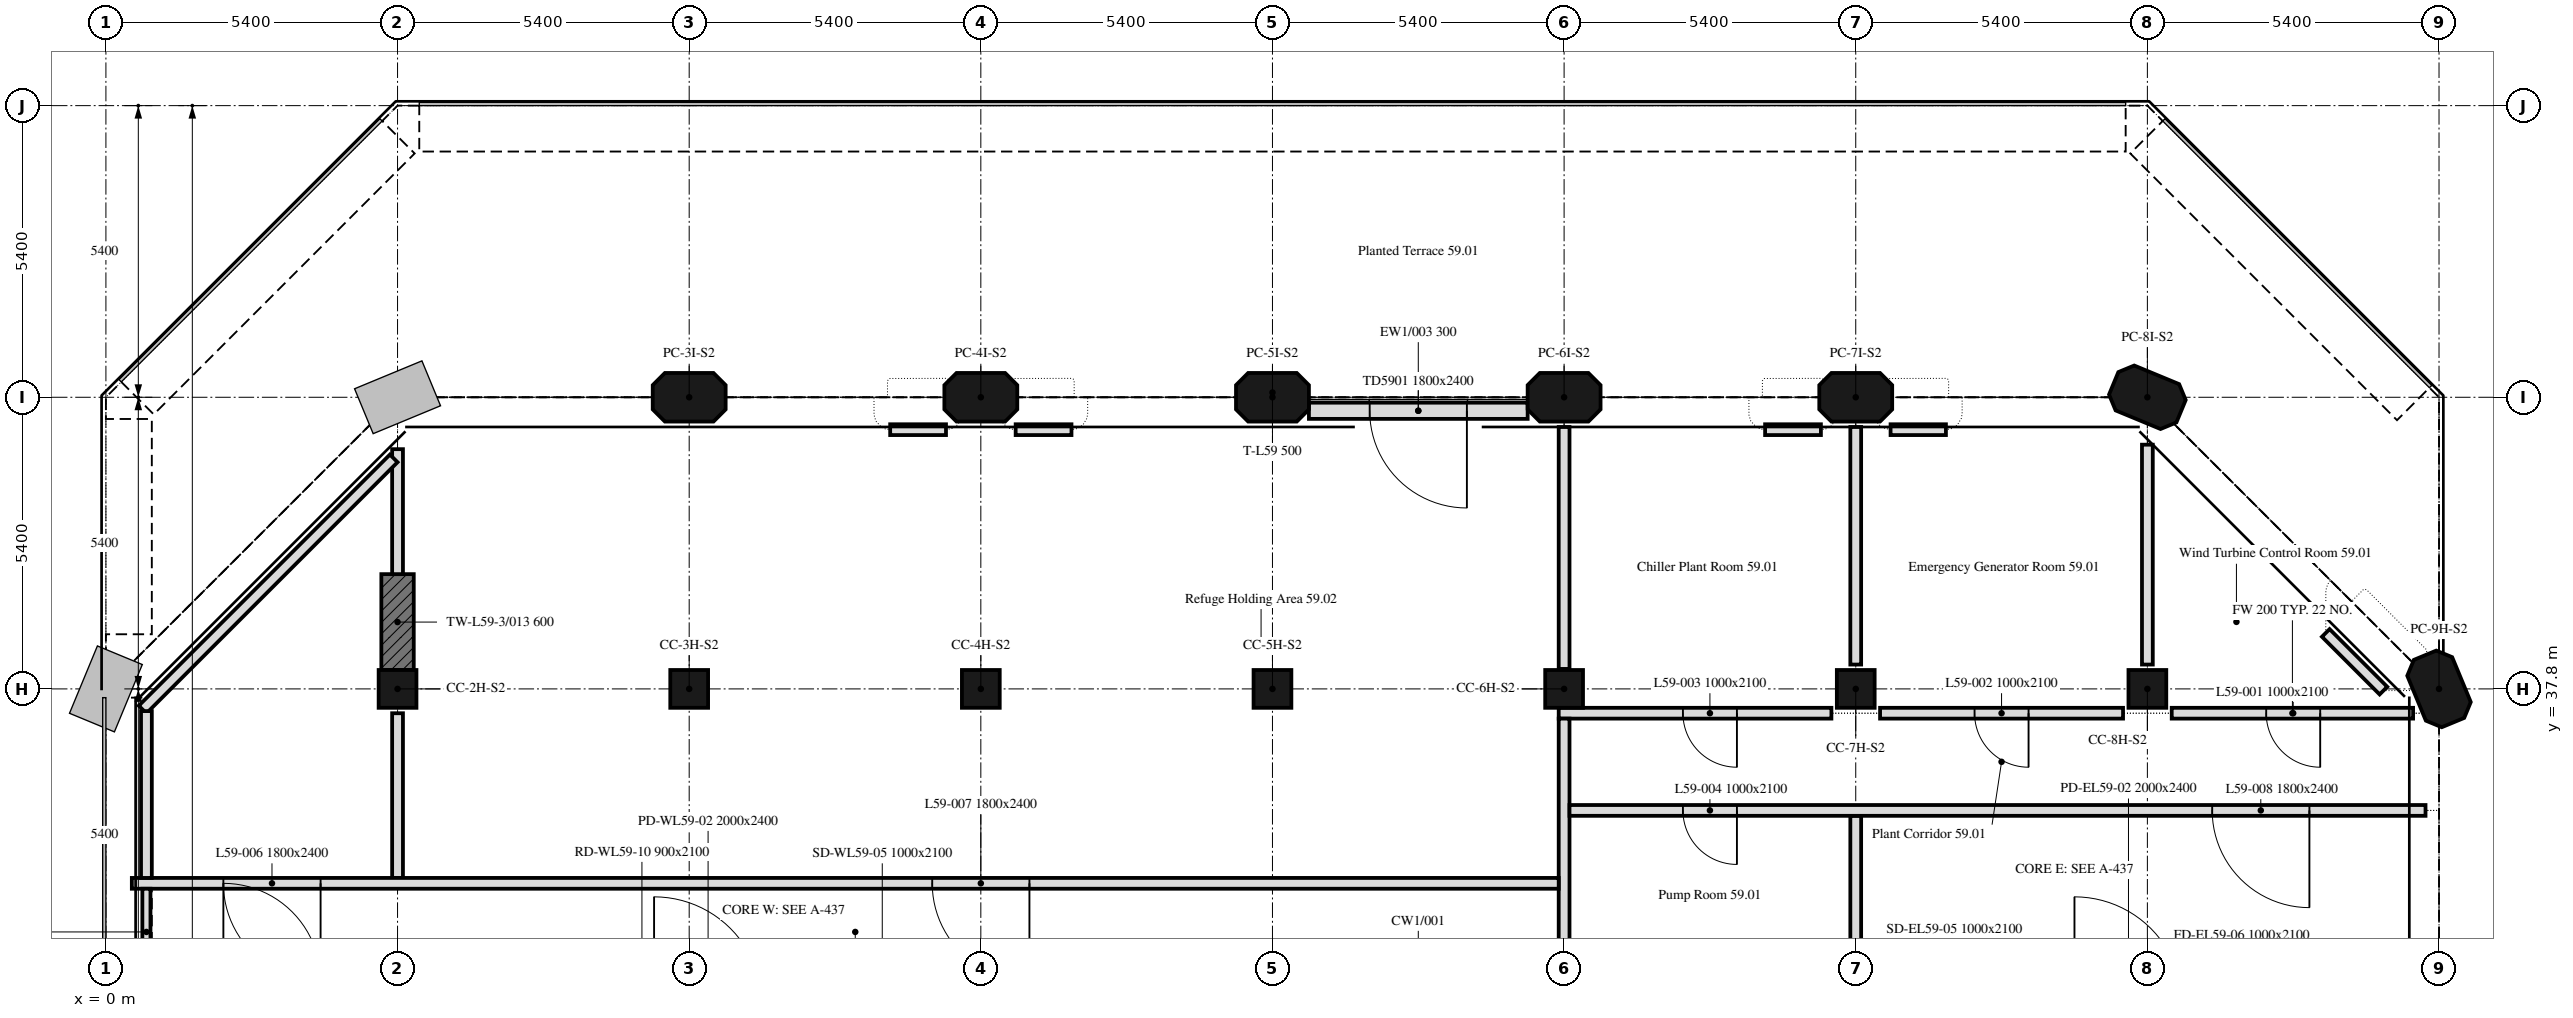
"""IFC4 building model, lengths in metres.
Left out: names, types, materials, properties, quantities, classifications, styles, units other than length and angle.
Written with IfcOpenShell. Run it as: python <this file> out.ifc"""

import sys

from ifc_helpers import new_model, si_unit, direction, frame, frame_2d, origin, origin_2d, place, context, subcontext, project, spatial, polyline, rectangle, outline, extrude, element, fill, save


model = new_model("IFC4")
c1 = context("Model", 3, precision=1e-05, world=origin(), true_north=direction((0.0, 1.0)))
c2 = subcontext(c1, "Body", "Model", "MODEL_VIEW")
j1 = project(units=[si_unit("LENGTHUNIT", "METRE"), si_unit("PLANEANGLEUNIT", "RADIAN")], contexts=[c1])
p1 = place(None, origin())
s1 = spatial("IfcSite", under=j1, at=p1, CompositionType="ELEMENT")
p2 = place(p1, origin())
s2 = spatial("IfcBuilding", under=s1, at=p2, CompositionType="ELEMENT")
p3 = place(p2, frame((0.0, 0.0, 233.5)))
s3 = spatial("IfcBuildingStorey", under=s2, at=p3, CompositionType="ELEMENT", Elevation=233.5)
for number, where, z_axis, x_axis in (
    (1, (5.4, 37.8, 0.0), (0.0, 0.0, 1.0), (1.0, 0.0, 0.0)),
    (2, (10.8, 37.8, 0.0), (0.0, 0.0, 1.0), (1.0, 0.0, 0.0)),
    (3, (16.2, 37.8, 0.0), (0.0, 0.0, 1.0), (1.0, 0.0, 0.0)),
    (4, (21.6, 37.8, 0.0), (0.0, 0.0, 1.0), (1.0, 0.0, 0.0)),
    (5, (27.0, 37.8, 0.0), (0.0, 0.0, 1.0), (1.0, 0.0, 0.0)),
    (6, (32.4, 37.8, 0.0), (0.0, 0.0, 1.0), (1.0, 0.0, 0.0)),
    (7, (37.8, 37.8, 0.0), (0.0, 0.0, 1.0), (1.0, 0.0, 0.0)),
):
    element("IfcColumn", number, at=place(p3, frame(where, z_axis=z_axis, x_axis=x_axis)), inside=s3, PredefinedType="COLUMN", context=c2, shape_type="SweptSolid", body=[
        extrude(rectangle(XDim=0.7, YDim=0.7, at=origin_2d()), origin(), (0.0, 0.0, 1.0), 9.3),
    ])
for number, where, z_axis, x_axis in (
    (8, (43.2, 37.8, 0.0), (0.0, 0.0, 1.0), (-0.383, 0.924, 0.0)),
    (9, (10.8, 43.2, 0.0), (0.0, 0.0, 1.0), (1.0, 0.0, 0.0)),
    (10, (16.2, 43.2, 0.0), (0.0, 0.0, 1.0), (1.0, 0.0, 0.0)),
    (11, (21.6, 43.2, 0.0), (0.0, 0.0, 1.0), (1.0, 0.0, 0.0)),
    (12, (27.0, 43.2, 0.0), (0.0, 0.0, 1.0), (1.0, 0.0, 0.0)),
    (13, (32.4, 43.2, 0.0), (0.0, 0.0, 1.0), (1.0, 0.0, 0.0)),
    (14, (37.8, 43.2, 0.0), (0.0, 0.0, 1.0), (-0.924, 0.383, 0.0)),
):
    element("IfcColumn", number, at=place(p3, frame(where, z_axis=z_axis, x_axis=x_axis)), inside=s3, PredefinedType="COLUMN", context=c2, shape_type="SweptSolid", body=[
        extrude(outline(polyline([(-0.45, -0.45), (0.45, -0.45), (0.675, -0.225), (0.675, 0.225), (0.45, 0.45), (-0.45, 0.45), (-0.675, 0.225), (-0.675, -0.225), (-0.45, -0.45)])), origin(), (0.0, 0.0, 1.0), 9.3),
    ])
p4 = place(p3, frame((5.4, 38.15, 0.0), z_axis=(0.0, 0.0, 1.0), x_axis=(0.0, 1.0, 0.0)))
e15 = element("IfcWall", 15, at=p4, inside=s3, PredefinedType="SHEAR", context=c2, shape_type="SweptSolid", body=[
    extrude(rectangle(XDim=1.775, YDim=0.6, at=frame_2d((0.888, 0.0))), origin(), (0.0, 0.0, 1.0), 9.3),
])
p5 = place(p3, frame((26.325, 42.95, 0.0), z_axis=(0.0, 0.0, 1.0), x_axis=(-1.0, 0.0, 0.0)))
e16 = element("IfcWall", 16, at=p5, inside=s3, PredefinedType="SOLIDWALL", context=c2, shape_type="SweptSolid", body=[
    extrude(rectangle(XDim=4.05, YDim=0.3, at=frame_2d((2.025, 0.0))), origin(), (0.0, 0.0, 1.0), 9.3),
])
p6 = place(p5, frame((1.125, 0.0, 0.0)))
e17 = element("IfcOpeningElement", 17, at=p6, cuts=e16, PredefinedType="OPENING", context=c2, shape_type="SweptSolid", body=[
    extrude(rectangle(XDim=1.8, YDim=2.4, at=frame_2d((0.9, 1.2))), frame((0.0, 0.16, 0.0), z_axis=(0.0, -1.0, 0.0), x_axis=(1.0, 0.0, 0.0)), (0.0, 0.0, 1.0), 0.32),
])
p7 = place(p3, frame((42.72, 37.35, 0.0), z_axis=(0.0, 0.0, 1.0), x_axis=(-1.0, 0.0, 0.0)))
e18 = element("IfcWall", 18, at=p7, inside=s3, PredefinedType="PARTITIONING", context=c2, shape_type="SweptSolid", body=[
    extrude(rectangle(XDim=4.469, YDim=0.2, at=frame_2d((2.235, 0.0))), origin(), (0.0, 0.0, 1.0), 9.3),
])
p8 = place(p7, frame((1.72, 0.0, 0.0)))
e19 = element("IfcOpeningElement", 19, at=p8, cuts=e18, PredefinedType="OPENING", context=c2, shape_type="SweptSolid", body=[
    extrude(rectangle(XDim=1.0, YDim=2.1, at=frame_2d((0.5, 1.05))), frame((0.0, 0.1, 0.0), z_axis=(0.0, -1.0, 0.0), x_axis=(1.0, 0.0, 0.0)), (0.0, 0.0, 1.0), 0.2),
])
p9 = place(p3, frame((37.8, 38.251, 0.0), z_axis=(0.0, 0.0, 1.0), x_axis=(0.0, 1.0, 0.0)))
e20 = element("IfcWall", 20, at=p9, inside=s3, PredefinedType="PARTITIONING", context=c2, shape_type="SweptSolid", body=[
    extrude(rectangle(XDim=4.072, YDim=0.2, at=frame_2d((2.036, 0.0))), origin(), (0.0, 0.0, 1.0), 9.3),
])
p10 = place(p3, frame((41.103, 38.836, 0.0), z_axis=(0.0, 0.0, 1.0), x_axis=(0.707187616485, -0.707025936646, 0.0)))
e21 = element("IfcWall", 21, at=p10, inside=s3, PredefinedType="PARTITIONING", context=c2, shape_type="SweptSolid", body=[
    extrude(rectangle(XDim=1.51, YDim=0.2, at=frame_2d((0.755, 0.0))), origin(), (0.0, 0.0, 1.0), 9.3),
])
p11 = place(p3, frame((37.349, 37.35, 0.0), z_axis=(0.0, 0.0, 1.0), x_axis=(-1.0, 0.0, 0.0)))
e22 = element("IfcWall", 22, at=p11, inside=s3, PredefinedType="PARTITIONING", context=c2, shape_type="SweptSolid", body=[
    extrude(rectangle(XDim=4.499, YDim=0.2, at=frame_2d((2.25, 0.0))), origin(), (0.0, 0.0, 1.0), 9.3),
])
p12 = place(p11, frame((1.75, 0.0, 0.0)))
e23 = element("IfcOpeningElement", 23, at=p12, cuts=e22, PredefinedType="OPENING", context=c2, shape_type="SweptSolid", body=[
    extrude(rectangle(XDim=1.0, YDim=2.1, at=frame_2d((0.5, 1.05))), frame((0.0, 0.1, 0.0), z_axis=(0.0, -1.0, 0.0), x_axis=(1.0, 0.0, 0.0)), (0.0, 0.0, 1.0), 0.2),
])
p13 = place(p3, frame((32.4, 38.251, 0.0), z_axis=(0.0, 0.0, 1.0), x_axis=(0.0, 1.0, 0.0)))
e24 = element("IfcWall", 24, at=p13, inside=s3, PredefinedType="PARTITIONING", context=c2, shape_type="SweptSolid", body=[
    extrude(rectangle(XDim=4.399, YDim=0.2, at=frame_2d((2.2, 0.0))), origin(), (0.0, 0.0, 1.0), 9.3),
])
p14 = place(p3, frame((33.045, 42.6, 0.0), z_axis=(0.0, 0.0, 1.0), x_axis=(1.0, 0.0, 0.0)))
e25 = element("IfcWall", 25, at=p14, inside=s3, PredefinedType="PARTITIONING", context=c2, shape_type="SweptSolid", body=[
    extrude(rectangle(XDim=1.025, YDim=0.2, at=frame_2d((0.512, 0.0))), origin(), (0.0, 0.0, 1.0), 9.3),
])
p15 = place(p3, frame((31.949, 37.35, 0.0), z_axis=(0.0, 0.0, 1.0), x_axis=(-1.0, 0.0, 0.0)))
e26 = element("IfcWall", 26, at=p15, inside=s3, PredefinedType="PARTITIONING", context=c2, shape_type="SweptSolid", body=[
    extrude(rectangle(XDim=5.049, YDim=0.2, at=frame_2d((2.525, 0.0))), origin(), (0.0, 0.0, 1.0), 9.3),
])
p16 = place(p15, frame((1.749, 0.0, 0.0)))
e27 = element("IfcOpeningElement", 27, at=p16, cuts=e26, PredefinedType="OPENING", context=c2, shape_type="SweptSolid", body=[
    extrude(rectangle(XDim=1.0, YDim=2.1, at=frame_2d((0.5, 1.05))), frame((0.0, 0.1, 0.0), z_axis=(0.0, -1.0, 0.0), x_axis=(1.0, 0.0, 0.0)), (0.0, 0.0, 1.0), 0.2),
])
p17 = place(p3, frame((27.0, 38.17, 0.0), z_axis=(0.0, 0.0, 1.0), x_axis=(0.0, 1.0, 0.0)))
e28 = element("IfcWall", 28, at=p17, inside=s3, PredefinedType="PARTITIONING", context=c2, shape_type="SweptSolid", body=[
    extrude(rectangle(XDim=4.48, YDim=0.2, at=frame_2d((2.24, 0.0))), origin(), (0.0, 0.0, 1.0), 9.3),
])
p18 = place(p3, frame((30.722, 42.6, 0.0), z_axis=(0.0, 0.0, 1.0), x_axis=(1.0, 0.0, 0.0)))
e29 = element("IfcWall", 29, at=p18, inside=s3, PredefinedType="PARTITIONING", context=c2, shape_type="SweptSolid", body=[
    extrude(rectangle(XDim=1.033, YDim=0.2, at=frame_2d((0.517, 0.0))), origin(), (0.0, 0.0, 1.0), 9.3),
])
p19 = place(p3, frame((5.4, 34.3, 0.0), z_axis=(0.0, 0.0, 1.0), x_axis=(0.0, 1.0, 0.0)))
e30 = element("IfcWall", 30, at=p19, inside=s3, PredefinedType="PARTITIONING", context=c2, shape_type="SweptSolid", body=[
    extrude(rectangle(XDim=3.049, YDim=0.2, at=frame_2d((1.525, 0.0))), origin(), (0.0, 0.0, 1.0), 9.3),
])
p20 = place(p3, frame((5.4, 39.925, 0.0), z_axis=(0.0, 0.0, 1.0), x_axis=(0.0, 1.0, 0.0)))
e31 = element("IfcWall", 31, at=p20, inside=s3, PredefinedType="PARTITIONING", context=c2, shape_type="SweptSolid", body=[
    extrude(rectangle(XDim=2.314, YDim=0.2, at=frame_2d((1.157, 0.0))), origin(), (0.0, 0.0, 1.0), 9.3),
])
for number, where, z_axis, x_axis in (
    (32, (14.521, 42.6, 0.0), (0.0, 0.0, 1.0), (1.0, 0.0, 0.0)),
    (33, (16.845, 42.6, 0.0), (0.0, 0.0, 1.0), (1.0, 0.0, 0.0)),
):
    element("IfcWall", number, at=place(p3, frame(where, z_axis=z_axis, x_axis=x_axis)), inside=s3, PredefinedType="PARTITIONING", context=c2, shape_type="SweptSolid", body=[
        extrude(rectangle(XDim=1.033, YDim=0.2, at=frame_2d((0.517, 0.0))), origin(), (0.0, 0.0, 1.0), 9.3),
    ])
p21 = place(p3, frame((32.4, 32.4, 0.0), z_axis=(0.0, 0.0, 1.0), x_axis=(0.0, 1.0, 0.0)))
e34 = element("IfcWall", 34, at=p21, inside=s3, PredefinedType="PARTITIONING", context=c2, shape_type="SweptSolid", body=[
    extrude(rectangle(XDim=3.05, YDim=0.2, at=frame_2d((1.525, 0.0))), origin(), (0.0, 0.0, 1.0), 9.3),
])
p22 = place(p3, frame((27.0, 37.25, 0.0), z_axis=(0.0, 0.0, 1.0), x_axis=(0.0, -1.0, 0.0)))
e35 = element("IfcWall", 35, at=p22, inside=s3, PredefinedType="PARTITIONING", context=c2, shape_type="SweptSolid", body=[
    extrude(rectangle(XDim=4.43, YDim=0.2, at=frame_2d((2.215, 0.0))), origin(), (0.0, 0.0, 1.0), 9.3),
])
p23 = place(p3, frame((42.95, 35.55, 0.0), z_axis=(0.0, 0.0, 1.0), x_axis=(-1.0, 0.0, 0.0)))
e36 = element("IfcWall", 36, at=p23, inside=s3, PredefinedType="PARTITIONING", context=c2, shape_type="SweptSolid", body=[
    extrude(rectangle(XDim=15.85, YDim=0.2, at=frame_2d((7.925, 0.0))), origin(), (0.0, 0.0, 1.0), 9.3),
])
p24 = place(p23, frame((12.75, 0.0, 0.0)))
e37 = element("IfcOpeningElement", 37, at=p24, cuts=e36, PredefinedType="OPENING", context=c2, shape_type="SweptSolid", body=[
    extrude(rectangle(XDim=1.0, YDim=2.1, at=frame_2d((0.5, 1.05))), frame((0.0, 0.1, 0.0), z_axis=(0.0, -1.0, 0.0), x_axis=(1.0, 0.0, 0.0)), (0.0, 0.0, 1.0), 0.2),
])
p25 = place(p23, frame((2.15, 0.0, 0.0)))
e38 = element("IfcOpeningElement", 38, at=p25, cuts=e36, PredefinedType="OPENING", context=c2, shape_type="SweptSolid", body=[
    extrude(rectangle(XDim=1.8, YDim=2.4, at=frame_2d((0.9, 1.2))), frame((0.0, 0.1, 0.0), z_axis=(0.0, -1.0, 0.0), x_axis=(1.0, 0.0, 0.0)), (0.0, 0.0, 1.0), 0.2),
])
p26 = place(p3, frame((26.9, 34.2, 0.0), z_axis=(0.0, 0.0, 1.0), x_axis=(-1.0, 0.0, 0.0)))
e39 = element("IfcWall", 39, at=p26, inside=s3, PredefinedType="PARTITIONING", context=c2, shape_type="SweptSolid", body=[
    extrude(rectangle(XDim=26.42, YDim=0.2, at=frame_2d((13.21, 0.0))), origin(), (0.0, 0.0, 1.0), 9.3),
])
p27 = place(p26, frame((22.925, 0.0, 0.0)))
e40 = element("IfcOpeningElement", 40, at=p27, cuts=e39, PredefinedType="OPENING", context=c2, shape_type="SweptSolid", body=[
    extrude(rectangle(XDim=1.8, YDim=2.4, at=frame_2d((0.9, 1.2))), frame((0.0, 0.1, 0.0), z_axis=(0.0, -1.0, 0.0), x_axis=(1.0, 0.0, 0.0)), (0.0, 0.0, 1.0), 0.2),
])
p28 = place(p26, frame((9.8, 0.0, 0.0)))
e41 = element("IfcOpeningElement", 41, at=p28, cuts=e39, PredefinedType="OPENING", context=c2, shape_type="SweptSolid", body=[
    extrude(rectangle(XDim=1.8, YDim=2.4, at=frame_2d((0.9, 1.2))), frame((0.0, 0.1, 0.0), z_axis=(0.0, -1.0, 0.0), x_axis=(1.0, 0.0, 0.0)), (0.0, 0.0, 1.0), 0.2),
])
p29 = place(p3, frame((0.75, 34.1, 0.0), z_axis=(0.0, 0.0, 1.0), x_axis=(0.0, -1.0, 0.0)))
e42 = element("IfcWall", 42, at=p29, inside=s3, PredefinedType="PARTITIONING", context=c2, shape_type="SweptSolid", body=[
    extrude(rectangle(XDim=1.6, YDim=0.15, at=frame_2d((0.8, 0.0))), origin(), (0.0, 0.0, 1.0), 9.3),
])
p30 = place(p3, frame((5.329, 42.068, 0.0), z_axis=(0.0, 0.0, 1.0), x_axis=(-0.707106781187, -0.707106781187, 0.0)))
e43 = element("IfcWall", 43, at=p30, inside=s3, PredefinedType="PARTITIONING", context=c2, shape_type="SweptSolid", body=[
    extrude(rectangle(XDim=6.576, YDim=0.2, at=frame_2d((3.288, 0.0))), origin(), (0.0, 0.0, 1.0), 9.3),
])
p31 = place(p3, frame((0.75, 37.389, 0.0), z_axis=(0.0, 0.0, 1.0), x_axis=(0.0, -1.0, 0.0)))
e44 = element("IfcWall", 44, at=p31, inside=s3, PredefinedType="PARTITIONING", context=c2, shape_type="SweptSolid", body=[
    extrude(rectangle(XDim=3.089, YDim=0.2, at=frame_2d((1.544, 0.0))), origin(), (0.0, 0.0, 1.0), 9.3),
])
p32 = place(p6, origin())
e45 = element("IfcDoor", 45, at=p32, inside=s3, OperationType="DOUBLE_DOOR_DOUBLE_SWING", PredefinedType="DOOR", context=c2, shape_type="SweptSolid", body=[
    extrude(rectangle(XDim=1.8, YDim=2.4, at=frame_2d((0.9, 1.2))), frame((0.0, 0.025, 0.0), z_axis=(0.0, -1.0, 0.0), x_axis=(1.0, 0.0, 0.0)), (0.0, 0.0, 1.0), 0.05),
])
fill(e17, e45)
p33 = place(p8, origin())
e46 = element("IfcDoor", 46, at=p33, inside=s3, OperationType="SINGLE_SWING_LEFT", PredefinedType="DOOR", context=c2, shape_type="SweptSolid", body=[
    extrude(rectangle(XDim=1.0, YDim=2.1, at=frame_2d((0.5, 1.05))), frame((0.0, 0.025, 0.0), z_axis=(0.0, -1.0, 0.0), x_axis=(1.0, 0.0, 0.0)), (0.0, 0.0, 1.0), 0.05),
])
fill(e19, e46)
p34 = place(p12, origin())
e47 = element("IfcDoor", 47, at=p34, inside=s3, OperationType="SINGLE_SWING_RIGHT", PredefinedType="DOOR", context=c2, shape_type="SweptSolid", body=[
    extrude(rectangle(XDim=1.0, YDim=2.1, at=frame_2d((0.5, 1.05))), frame((0.0, 0.025, 0.0), z_axis=(0.0, -1.0, 0.0), x_axis=(1.0, 0.0, 0.0)), (0.0, 0.0, 1.0), 0.05),
])
fill(e23, e47)
p35 = place(p16, origin())
e48 = element("IfcDoor", 48, at=p35, inside=s3, OperationType="SINGLE_SWING_LEFT", PredefinedType="DOOR", context=c2, shape_type="SweptSolid", body=[
    extrude(rectangle(XDim=1.0, YDim=2.1, at=frame_2d((0.5, 1.05))), frame((0.0, 0.025, 0.0), z_axis=(0.0, -1.0, 0.0), x_axis=(1.0, 0.0, 0.0)), (0.0, 0.0, 1.0), 0.05),
])
fill(e27, e48)
p36 = place(p24, origin())
e49 = element("IfcDoor", 49, at=p36, inside=s3, OperationType="SINGLE_SWING_LEFT", PredefinedType="DOOR", context=c2, shape_type="SweptSolid", body=[
    extrude(rectangle(XDim=1.0, YDim=2.1, at=frame_2d((0.5, 1.05))), frame((0.0, 0.025, 0.0), z_axis=(0.0, -1.0, 0.0), x_axis=(1.0, 0.0, 0.0)), (0.0, 0.0, 1.0), 0.05),
])
fill(e37, e49)
p37 = place(p27, origin())
e50 = element("IfcDoor", 50, at=p37, inside=s3, OperationType="DOUBLE_DOOR_SINGLE_SWING", PredefinedType="DOOR", context=c2, shape_type="SweptSolid", body=[
    extrude(rectangle(XDim=1.8, YDim=2.4, at=frame_2d((0.9, 1.2))), frame((0.0, 0.025, 0.0), z_axis=(0.0, -1.0, 0.0), x_axis=(1.0, 0.0, 0.0)), (0.0, 0.0, 1.0), 0.05),
])
fill(e40, e50)
p38 = place(p28, origin())
e51 = element("IfcDoor", 51, at=p38, inside=s3, OperationType="DOUBLE_DOOR_SINGLE_SWING", PredefinedType="DOOR", context=c2, shape_type="SweptSolid", body=[
    extrude(rectangle(XDim=1.8, YDim=2.4, at=frame_2d((0.9, 1.2))), frame((0.0, 0.025, 0.0), z_axis=(0.0, -1.0, 0.0), x_axis=(1.0, 0.0, 0.0)), (0.0, 0.0, 1.0), 0.05),
])
fill(e41, e51)
p39 = place(p25, origin())
e52 = element("IfcDoor", 52, at=p39, inside=s3, OperationType="DOUBLE_DOOR_SINGLE_SWING", PredefinedType="DOOR", context=c2, shape_type="SweptSolid", body=[
    extrude(rectangle(XDim=1.8, YDim=2.4, at=frame_2d((0.9, 1.2))), frame((0.0, 0.025, 0.0), z_axis=(0.0, -1.0, 0.0), x_axis=(1.0, 0.0, 0.0)), (0.0, 0.0, 1.0), 0.05),
])
fill(e38, e52)
save(model, sys.argv[1])
